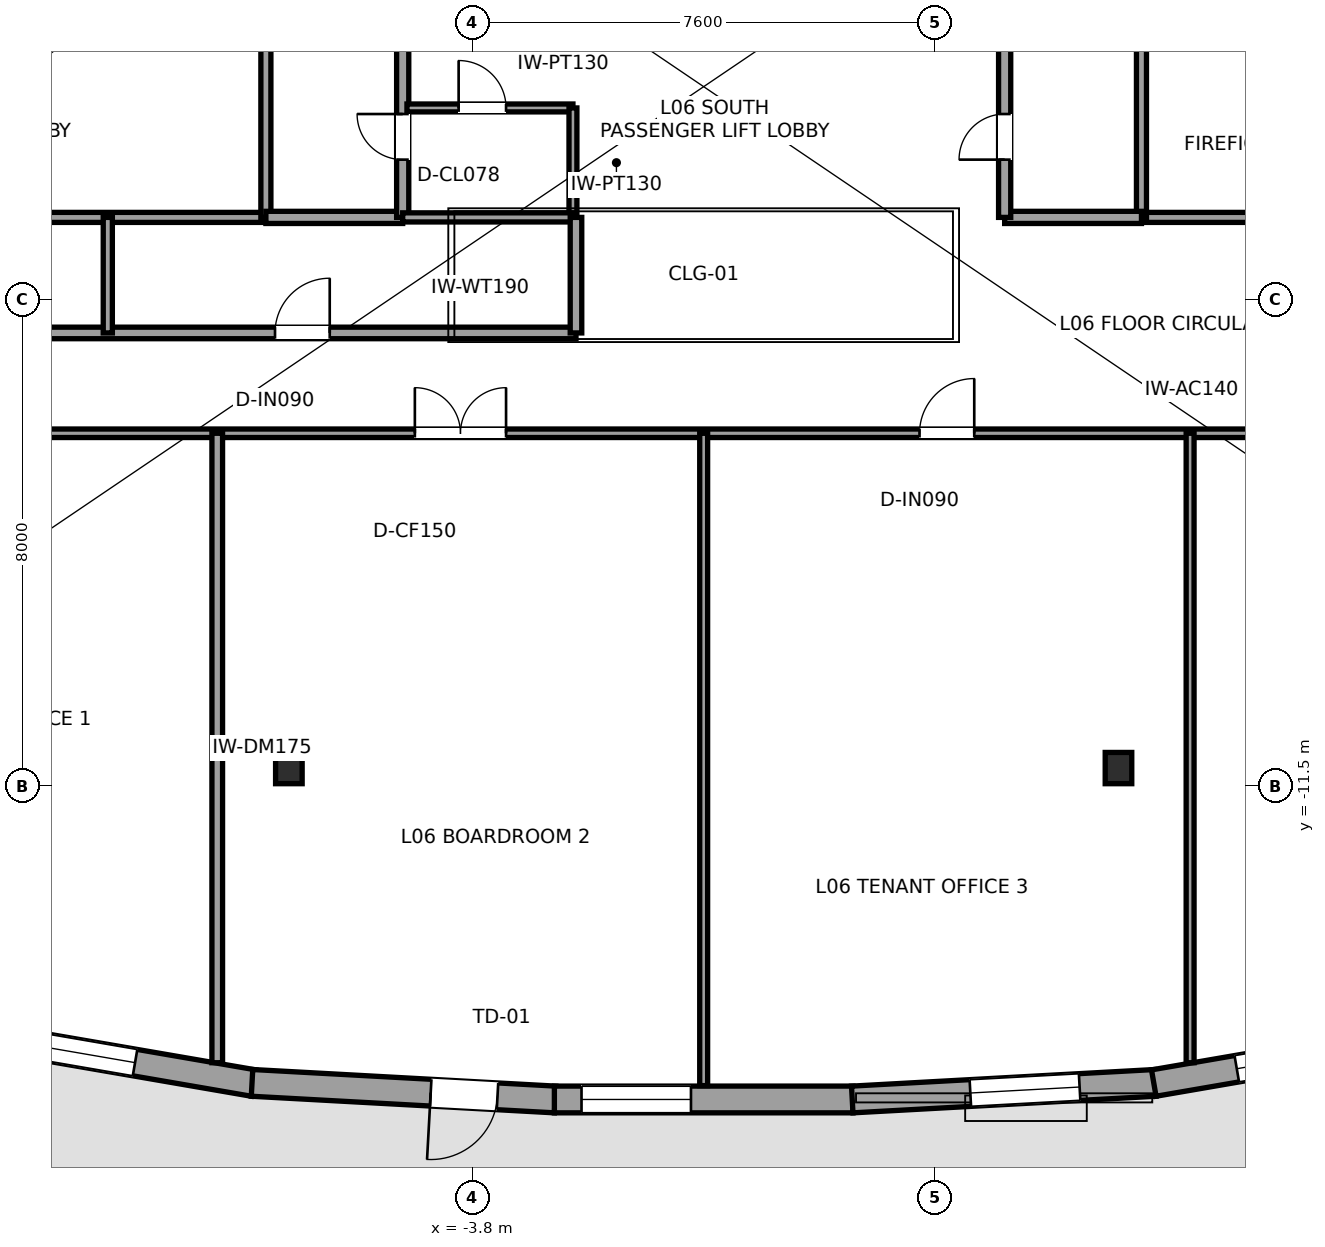
"""IFC4 building model, lengths in metres.
Left out: names, types, materials, properties, quantities, classifications, styles, units other than length and angle.
Written with IfcOpenShell. Run it as: python <this file> out.ifc"""

import sys

from ifc_helpers import new_model, si_unit, direction, frame, frame_2d, origin, origin_2d, place, context, subcontext, project, spatial, rectangle, i_section, extrude, element, fill, save


model = new_model("IFC4")
c1 = context("Model", 3, precision=1e-05, world=origin(), true_north=direction((0.0, 1.0)))
c2 = subcontext(c1, "Body", "Model", "MODEL_VIEW")
j1 = project(units=[si_unit("LENGTHUNIT", "METRE"), si_unit("PLANEANGLEUNIT", "RADIAN")], contexts=[c1])
p1 = place(None, origin())
s1 = spatial("IfcSite", under=j1, at=p1, CompositionType="ELEMENT")
p2 = place(p1, origin())
s2 = spatial("IfcBuilding", under=s1, at=p2, CompositionType="ELEMENT")
p3 = place(p2, frame((0.0, 0.0, 27.0)))
s3 = spatial("IfcBuildingStorey", under=s2, at=p3, CompositionType="ELEMENT", Elevation=27.0)
for number, where, z_axis, x_axis in (
    (1, (-6.822, -11.206, 0.0), (0.0, 0.0, 1.0), (1.0, 0.0, 0.0)),
    (2, (6.822, -11.206, 0.0), (0.0, 0.0, 1.0), (1.0, 0.0, 0.0)),
):
    element("IfcColumn", number, at=place(p3, frame(where, z_axis=z_axis, x_axis=x_axis)), inside=s3, PredefinedType="COLUMN", context=c2, shape_type="SweptSolid", body=[
        extrude(i_section(OverallWidth=0.437, OverallDepth=0.514, WebThickness=0.061, FlangeThickness=0.097, at=origin_2d()), origin(), (0.0, 0.0, 1.0), 3.6),
    ])
p4 = place(p3, frame((-7.403, -16.386, 0.0), z_axis=(0.0, 0.0, 1.0), x_axis=(-0.985480149415, 0.169790680278, 0.0)))
e3 = element("IfcWall", 3, at=p4, inside=s3, PredefinedType="STANDARD", context=c2, shape_type="SweptSolid", body=[
    extrude(rectangle(XDim=5.064, YDim=0.44, at=frame_2d((2.532, 0.0))), origin(), (0.0, 0.0, 1.0), 2.533),
])
p5 = place(p4, frame((1.978, 0.0, 0.65)))
e4 = element("IfcOpeningElement", 4, at=p5, cuts=e3, PredefinedType="OPENING", context=c2, shape_type="SweptSolid", body=[
    extrude(rectangle(XDim=1.8, YDim=1.7, at=frame_2d((0.9, 0.85))), frame((0.0, 0.23, 0.0), z_axis=(0.0, -1.0, 0.0), x_axis=(1.0, 0.0, 0.0)), (0.0, 0.0, 1.0), 0.46),
])
p6 = place(p3, frame((-2.443, -16.656, 0.0), z_axis=(0.0, 0.0, 1.0), x_axis=(-0.998501456853, 0.054725137396, 0.0)))
e5 = element("IfcWall", 5, at=p6, inside=s3, PredefinedType="STANDARD", context=c2, shape_type="SweptSolid", body=[
    extrude(rectangle(XDim=4.992, YDim=0.44, at=frame_2d((2.496, 0.0))), origin(), (0.0, 0.0, 1.0), 2.533),
])
p7 = place(p6, frame((0.949, 0.0, 0.0)))
e6 = element("IfcOpeningElement", 6, at=p7, cuts=e5, PredefinedType="OPENING", context=c2, shape_type="SweptSolid", body=[
    extrude(rectangle(XDim=1.1, YDim=2.15, at=frame_2d((0.55, 1.075))), frame((0.0, 0.23, 0.0), z_axis=(0.0, -1.0, 0.0), x_axis=(1.0, 0.0, 0.0)), (0.0, 0.0, 1.0), 0.46),
])
p8 = place(p3, frame((2.455, -16.656, 0.0), z_axis=(0.0, 0.0, 1.0), x_axis=(-1.0, 0.0, 0.0)))
e7 = element("IfcWall", 7, at=p8, inside=s3, PredefinedType="STANDARD", context=c2, shape_type="SweptSolid", body=[
    extrude(rectangle(XDim=4.911, YDim=0.44, at=frame_2d((2.455, 0.0))), origin(), (0.0, 0.0, 1.0), 2.533),
])
p9 = place(p8, frame((2.664, 0.0, 0.65)))
e8 = element("IfcOpeningElement", 8, at=p9, cuts=e7, PredefinedType="OPENING", context=c2, shape_type="SweptSolid", body=[
    extrude(rectangle(XDim=1.8, YDim=1.7, at=frame_2d((0.9, 0.85))), frame((0.0, 0.23, 0.0), z_axis=(0.0, -1.0, 0.0), x_axis=(1.0, 0.0, 0.0)), (0.0, 0.0, 1.0), 0.46),
])
p10 = place(p3, frame((7.428, -16.383, 0.0), z_axis=(0.0, 0.0, 1.0), x_axis=(-0.998501456853, -0.054725137396, 0.0)))
e9 = element("IfcWall", 9, at=p10, inside=s3, PredefinedType="STANDARD", context=c2, shape_type="SweptSolid", body=[
    extrude(rectangle(XDim=4.992, YDim=0.44, at=frame_2d((2.496, 0.0))), origin(), (0.0, 0.0, 1.0), 2.533),
])
p11 = place(p10, frame((1.247, 0.0, 0.65)))
e10 = element("IfcOpeningElement", 10, at=p11, cuts=e9, PredefinedType="OPENING", context=c2, shape_type="SweptSolid", body=[
    extrude(rectangle(XDim=1.8, YDim=1.7, at=frame_2d((0.9, 0.85))), frame((0.0, 0.23, 0.0), z_axis=(0.0, -1.0, 0.0), x_axis=(1.0, 0.0, 0.0)), (0.0, 0.0, 1.0), 0.46),
])
p12 = place(p3, frame((12.393, -15.526, 0.0), z_axis=(0.0, 0.0, 1.0), x_axis=(-0.985480149415, -0.169790680278, 0.0)))
e11 = element("IfcWall", 11, at=p12, inside=s3, PredefinedType="STANDARD", context=c2, shape_type="SweptSolid", body=[
    extrude(rectangle(XDim=5.064, YDim=0.44, at=frame_2d((2.532, 0.0))), origin(), (0.0, 0.0, 1.0), 2.533),
])
p13 = place(p12, frame((1.879, 0.0, 0.65)))
e12 = element("IfcOpeningElement", 12, at=p13, cuts=e11, PredefinedType="OPENING", context=c2, shape_type="SweptSolid", body=[
    extrude(rectangle(XDim=1.8, YDim=1.7, at=frame_2d((0.9, 0.85))), frame((0.0, 0.23, 0.0), z_axis=(0.0, -1.0, 0.0), x_axis=(1.0, 0.0, 0.0)), (0.0, 0.0, 1.0), 0.46),
])
p14 = place(p3, frame((-13.45, -2.15, 0.0), z_axis=(0.0, 0.0, 1.0), x_axis=(1.0, 0.0, 0.0)))
e13 = element("IfcWall", 13, at=p14, inside=s3, PredefinedType="PARTITIONING", context=c2, shape_type="SweptSolid", body=[
    extrude(rectangle(XDim=6.25, YDim=0.165, at=frame_2d((3.125, 0.0))), origin(), (0.0, 0.0, 1.0), 3.4),
])
p15 = place(p3, frame((-7.2, -2.15, 0.0), z_axis=(0.0, 0.0, 1.0), x_axis=(0.0, 1.0, 0.0)))
e14 = element("IfcWall", 14, at=p15, inside=s3, PredefinedType="PARTITIONING", context=c2, shape_type="SweptSolid", body=[
    extrude(rectangle(XDim=3.15, YDim=0.165, at=frame_2d((1.575, 0.0))), origin(), (0.0, 0.0, 1.0), 2.853),
])
p16 = place(p3, frame((-7.2, -2.15, 0.0), z_axis=(0.0, 0.0, 1.0), x_axis=(1.0, 0.0, 0.0)))
e15 = element("IfcWall", 15, at=p16, inside=s3, PredefinedType="SOLIDWALL", context=c2, shape_type="SweptSolid", body=[
    extrude(rectangle(XDim=2.25, YDim=0.2, at=frame_2d((1.125, 0.0))), origin(), (0.0, 0.0, 1.0), 3.4),
])
p17 = place(p3, frame((-4.95, -2.15, 0.0), z_axis=(0.0, 0.0, 1.0), x_axis=(0.0, 1.0, 0.0)))
e16 = element("IfcWall", 16, at=p17, inside=s3, PredefinedType="SOLIDWALL", context=c2, shape_type="SweptSolid", body=[
    extrude(rectangle(XDim=3.15, YDim=0.2, at=frame_2d((1.575, 0.0))), origin(), (0.0, 0.0, 1.0), 2.853),
])
p18 = place(p17, frame((0.95, 0.0, 0.0)))
e17 = element("IfcOpeningElement", 17, at=p18, cuts=e16, PredefinedType="OPENING", context=c2, shape_type="SweptSolid", body=[
    extrude(rectangle(XDim=0.75, YDim=2.1, at=frame_2d((0.375, 1.05))), frame((0.0, 0.11, 0.0), z_axis=(0.0, -1.0, 0.0), x_axis=(1.0, 0.0, 0.0)), (0.0, 0.0, 1.0), 0.22),
])
p19 = place(p3, frame((7.2, -2.15, 0.0), z_axis=(0.0, 0.0, 1.0), x_axis=(1.0, 0.0, 0.0)))
e18 = element("IfcWall", 18, at=p19, inside=s3, PredefinedType="PARTITIONING", context=c2, shape_type="SweptSolid", body=[
    extrude(rectangle(XDim=6.25, YDim=0.165, at=frame_2d((3.125, 0.0))), origin(), (0.0, 0.0, 1.0), 2.853),
])
p20 = place(p3, frame((7.2, -2.15, 0.0), z_axis=(0.0, 0.0, 1.0), x_axis=(0.0, 1.0, 0.0)))
e19 = element("IfcWall", 19, at=p20, inside=s3, PredefinedType="PARTITIONING", context=c2, shape_type="SweptSolid", body=[
    extrude(rectangle(XDim=3.15, YDim=0.165, at=frame_2d((1.575, 0.0))), origin(), (0.0, 0.0, 1.0), 2.853),
])
p21 = place(p3, frame((4.95, -2.15, 0.0), z_axis=(0.0, 0.0, 1.0), x_axis=(1.0, 0.0, 0.0)))
e20 = element("IfcWall", 20, at=p21, inside=s3, PredefinedType="SOLIDWALL", context=c2, shape_type="SweptSolid", body=[
    extrude(rectangle(XDim=2.25, YDim=0.2, at=frame_2d((1.125, 0.0))), origin(), (0.0, 0.0, 1.0), 3.4),
])
p22 = place(p3, frame((4.95, -2.15, 0.0), z_axis=(0.0, 0.0, 1.0), x_axis=(0.0, 1.0, 0.0)))
e21 = element("IfcWall", 21, at=p22, inside=s3, PredefinedType="SOLIDWALL", context=c2, shape_type="SweptSolid", body=[
    extrude(rectangle(XDim=3.15, YDim=0.2, at=frame_2d((1.575, 0.0))), origin(), (0.0, 0.0, 1.0), 2.853),
])
p23 = place(p22, frame((0.95, 0.0, 0.0)))
e22 = element("IfcOpeningElement", 22, at=p23, cuts=e21, PredefinedType="OPENING", context=c2, shape_type="SweptSolid", body=[
    extrude(rectangle(XDim=0.75, YDim=2.1, at=frame_2d((0.375, 1.05))), frame((0.0, 0.11, 0.0), z_axis=(0.0, -1.0, 0.0), x_axis=(1.0, 0.0, 0.0)), (0.0, 0.0, 1.0), 0.22),
])
p24 = place(p3, frame((-4.88, -0.35, 0.0), z_axis=(0.0, 0.0, 1.0), x_axis=(1.0, 0.0, 0.0)))
e23 = element("IfcWall", 23, at=p24, inside=s3, PredefinedType="PARTITIONING", context=c2, shape_type="SweptSolid", body=[
    extrude(rectangle(XDim=2.73, YDim=0.13, at=frame_2d((1.365, 0.0))), origin(), (0.0, 0.0, 1.0), 3.4),
])
p25 = place(p24, frame((0.85, 0.0, 0.0)))
e24 = element("IfcOpeningElement", 24, at=p25, cuts=e23, PredefinedType="OPENING", context=c2, shape_type="SweptSolid", body=[
    extrude(rectangle(XDim=0.78, YDim=2.1, at=frame_2d((0.39, 1.05))), frame((0.0, 0.075, 0.0), z_axis=(0.0, -1.0, 0.0), x_axis=(1.0, 0.0, 0.0)), (0.0, 0.0, 1.0), 0.15),
])
p26 = place(p3, frame((-2.15, -2.15, 0.0), z_axis=(0.0, 0.0, 1.0), x_axis=(0.0, 1.0, 0.0)))
e25 = element("IfcWall", 25, at=p26, inside=s3, PredefinedType="PARTITIONING", context=c2, shape_type="SweptSolid", body=[
    extrude(rectangle(XDim=1.8, YDim=0.13, at=frame_2d((0.9, 0.0))), origin(), (0.0, 0.0, 1.0), 3.4),
])
p27 = place(p3, frame((-13.45, -4.05, 0.0), z_axis=(0.0, 0.0, 1.0), x_axis=(1.0, 0.0, 0.0)))
e26 = element("IfcWall", 26, at=p27, inside=s3, PredefinedType="PLUMBINGWALL", context=c2, shape_type="SweptSolid", body=[
    extrude(rectangle(XDim=11.35, YDim=0.19, at=frame_2d((5.675, 0.0))), origin(), (0.0, 0.0, 1.0), 2.853),
])
p28 = place(p27, frame((1.25, 0.0, 0.0)))
e27 = element("IfcOpeningElement", 27, at=p28, cuts=e26, PredefinedType="OPENING", context=c2, shape_type="SweptSolid", body=[
    extrude(rectangle(XDim=0.95, YDim=2.15, at=frame_2d((0.475, 1.075))), frame((0.0, 0.105, 0.0), z_axis=(0.0, -1.0, 0.0), x_axis=(1.0, 0.0, 0.0)), (0.0, 0.0, 1.0), 0.21),
])
p29 = place(p27, frame((6.4, 0.0, 0.0)))
e28 = element("IfcOpeningElement", 28, at=p29, cuts=e26, PredefinedType="OPENING", context=c2, shape_type="SweptSolid", body=[
    extrude(rectangle(XDim=0.9, YDim=2.1, at=frame_2d((0.45, 1.05))), frame((0.0, 0.105, 0.0), z_axis=(0.0, -1.0, 0.0), x_axis=(1.0, 0.0, 0.0)), (0.0, 0.0, 1.0), 0.21),
])
p30 = place(p3, frame((-4.95, -2.15, 0.0), z_axis=(0.0, 0.0, 1.0), x_axis=(1.0, 0.0, 0.0)))
e29 = element("IfcWall", 29, at=p30, inside=s3, PredefinedType="PLUMBINGWALL", context=c2, shape_type="SweptSolid", body=[
    extrude(rectangle(XDim=2.85, YDim=0.15, at=frame_2d((1.425, 0.0))), origin(), (0.0, 0.0, 1.0), 2.853),
])
p31 = place(p3, frame((-2.1, -4.05, 0.0), z_axis=(0.0, 0.0, 1.0), x_axis=(0.0, 1.0, 0.0)))
e30 = element("IfcWall", 30, at=p31, inside=s3, PredefinedType="PLUMBINGWALL", context=c2, shape_type="SweptSolid", body=[
    extrude(rectangle(XDim=1.9, YDim=0.19, at=frame_2d((0.95, 0.0))), origin(), (0.0, 0.0, 1.0), 3.4),
])
p32 = place(p3, frame((-9.8, -4.05, 0.0), z_axis=(0.0, 0.0, 1.0), x_axis=(0.0, 1.0, 0.0)))
e31 = element("IfcWall", 31, at=p32, inside=s3, PredefinedType="PLUMBINGWALL", context=c2, shape_type="SweptSolid", body=[
    extrude(rectangle(XDim=1.9, YDim=0.15, at=frame_2d((0.95, 0.0))), origin(), (0.0, 0.0, 1.0), 2.853),
])
p33 = place(p3, frame((-16.1, -5.7, 0.0), z_axis=(0.0, 0.0, 1.0), x_axis=(1.0, 0.0, 0.0)))
e32 = element("IfcWall", 32, at=p33, inside=s3, PredefinedType="PARTITIONING", context=c2, shape_type="SweptSolid", body=[
    extrude(rectangle(XDim=32.2, YDim=0.14, at=frame_2d((16.1, 0.0))), origin(), (0.0, 0.0, 1.0), 2.853),
])
p34 = place(p33, frame((3.6, 0.0, 0.0)))
e33 = element("IfcOpeningElement", 33, at=p34, cuts=e32, PredefinedType="OPENING", context=c2, shape_type="SweptSolid", body=[
    extrude(rectangle(XDim=0.9, YDim=2.1, at=frame_2d((0.45, 1.05))), frame((0.0, 0.08, 0.0), z_axis=(0.0, -1.0, 0.0), x_axis=(1.0, 0.0, 0.0)), (0.0, 0.0, 1.0), 0.16),
])
p35 = place(p33, frame((11.35, 0.0, 0.0)))
e34 = element("IfcOpeningElement", 34, at=p35, cuts=e32, PredefinedType="OPENING", context=c2, shape_type="SweptSolid", body=[
    extrude(rectangle(XDim=1.5, YDim=2.15, at=frame_2d((0.75, 1.075))), frame((0.0, 0.08, 0.0), z_axis=(0.0, -1.0, 0.0), x_axis=(1.0, 0.0, 0.0)), (0.0, 0.0, 1.0), 0.16),
])
p36 = place(p33, frame((19.65, 0.0, 0.0)))
e35 = element("IfcOpeningElement", 35, at=p36, cuts=e32, PredefinedType="OPENING", context=c2, shape_type="SweptSolid", body=[
    extrude(rectangle(XDim=0.9, YDim=2.1, at=frame_2d((0.45, 1.05))), frame((0.0, 0.08, 0.0), z_axis=(0.0, -1.0, 0.0), x_axis=(1.0, 0.0, 0.0)), (0.0, 0.0, 1.0), 0.16),
])
p37 = place(p33, frame((27.7, 0.0, 0.0)))
e36 = element("IfcOpeningElement", 36, at=p37, cuts=e32, PredefinedType="OPENING", context=c2, shape_type="SweptSolid", body=[
    extrude(rectangle(XDim=0.9, YDim=2.1, at=frame_2d((0.45, 1.05))), frame((0.0, 0.08, 0.0), z_axis=(0.0, -1.0, 0.0), x_axis=(1.0, 0.0, 0.0)), (0.0, 0.0, 1.0), 0.16),
])
p38 = place(p3, frame((-8.0, -16.052, 0.0), z_axis=(0.0, 0.0, 1.0), x_axis=(0.0, 1.0, 0.0)))
e37 = element("IfcWall", 37, at=p38, inside=s3, PredefinedType="PARTITIONING", context=c2, shape_type="SweptSolid", body=[
    extrude(rectangle(XDim=10.352, YDim=0.175, at=frame_2d((5.176, 0.0))), origin(), (0.0, 0.0, 1.0), 2.853),
])
p39 = place(p3, frame((0.0, -16.428, 0.0), z_axis=(0.0, 0.0, 1.0), x_axis=(0.0, 1.0, 0.0)))
e38 = element("IfcWall", 38, at=p39, inside=s3, PredefinedType="PARTITIONING", context=c2, shape_type="SweptSolid", body=[
    extrude(rectangle(XDim=10.728, YDim=0.13, at=frame_2d((5.364, 0.0))), origin(), (0.0, 0.0, 1.0), 2.853),
])
p40 = place(p3, frame((8.0, -16.052, 0.0), z_axis=(0.0, 0.0, 1.0), x_axis=(0.0, 1.0, 0.0)))
e39 = element("IfcWall", 39, at=p40, inside=s3, PredefinedType="PARTITIONING", context=c2, shape_type="SweptSolid", body=[
    extrude(rectangle(XDim=10.352, YDim=0.13, at=frame_2d((5.176, 0.0))), origin(), (0.0, 0.0, 1.0), 2.853),
])
p41 = place(p5, origin())
e40 = element("IfcWindow", 40, at=p41, inside=s3, PartitioningType="SINGLE_PANEL", PredefinedType="WINDOW", context=c2, shape_type="SweptSolid", body=[
    extrude(rectangle(XDim=1.8, YDim=1.7, at=frame_2d((0.9, 0.85))), frame((0.0, -0.01, 0.0), z_axis=(0.0, -1.0, 0.0), x_axis=(1.0, 0.0, 0.0)), (0.0, 0.0, 1.0), 0.06),
])
fill(e4, e40)
p42 = place(p7, origin())
e41 = element("IfcDoor", 41, at=p42, inside=s3, OperationType="SINGLE_SWING_RIGHT", PredefinedType="DOOR", context=c2, shape_type="SweptSolid", body=[
    extrude(rectangle(XDim=1.1, YDim=2.15, at=frame_2d((0.55, 1.075))), frame((0.0, 0.025, 0.0), z_axis=(0.0, -1.0, 0.0), x_axis=(1.0, 0.0, 0.0)), (0.0, 0.0, 1.0), 0.05),
])
fill(e6, e41)
p43 = place(p9, origin())
e42 = element("IfcWindow", 42, at=p43, inside=s3, PartitioningType="SINGLE_PANEL", PredefinedType="WINDOW", context=c2, shape_type="SweptSolid", body=[
    extrude(rectangle(XDim=1.8, YDim=1.7, at=frame_2d((0.9, 0.85))), frame((0.0, -0.01, 0.0), z_axis=(0.0, -1.0, 0.0), x_axis=(1.0, 0.0, 0.0)), (0.0, 0.0, 1.0), 0.06),
])
fill(e8, e42)
p44 = place(p11, origin())
e43 = element("IfcWindow", 43, at=p44, inside=s3, PartitioningType="SINGLE_PANEL", PredefinedType="WINDOW", context=c2, shape_type="SweptSolid", body=[
    extrude(rectangle(XDim=1.8, YDim=1.7, at=frame_2d((0.9, 0.85))), frame((0.0, -0.01, 0.0), z_axis=(0.0, -1.0, 0.0), x_axis=(1.0, 0.0, 0.0)), (0.0, 0.0, 1.0), 0.06),
])
fill(e10, e43)
p45 = place(p13, origin())
e44 = element("IfcWindow", 44, at=p45, inside=s3, PartitioningType="SINGLE_PANEL", PredefinedType="WINDOW", context=c2, shape_type="SweptSolid", body=[
    extrude(rectangle(XDim=1.8, YDim=1.7, at=frame_2d((0.9, 0.85))), frame((0.0, -0.01, 0.0), z_axis=(0.0, -1.0, 0.0), x_axis=(1.0, 0.0, 0.0)), (0.0, 0.0, 1.0), 0.06),
])
fill(e12, e44)
p46 = place(p18, origin())
e45 = element("IfcDoor", 45, at=p46, inside=s3, OperationType="SINGLE_SWING_RIGHT", PredefinedType="DOOR", context=c2, shape_type="SweptSolid", body=[
    extrude(rectangle(XDim=0.75, YDim=2.1, at=frame_2d((0.375, 1.05))), frame((0.0, 0.025, 0.0), z_axis=(0.0, -1.0, 0.0), x_axis=(1.0, 0.0, 0.0)), (0.0, 0.0, 1.0), 0.05),
])
fill(e17, e45)
p47 = place(p23, origin())
e46 = element("IfcDoor", 46, at=p47, inside=s3, OperationType="SINGLE_SWING_LEFT", PredefinedType="DOOR", context=c2, shape_type="SweptSolid", body=[
    extrude(rectangle(XDim=0.75, YDim=2.1, at=frame_2d((0.375, 1.05))), frame((0.0, 0.025, 0.0), z_axis=(0.0, -1.0, 0.0), x_axis=(1.0, 0.0, 0.0)), (0.0, 0.0, 1.0), 0.05),
])
fill(e22, e46)
p48 = place(p25, origin())
e47 = element("IfcDoor", 47, at=p48, inside=s3, OperationType="SINGLE_SWING_LEFT", PredefinedType="DOOR", context=c2, shape_type="SweptSolid", body=[
    extrude(rectangle(XDim=0.78, YDim=2.1, at=frame_2d((0.39, 1.05))), frame((0.0, 0.025, 0.0), z_axis=(0.0, -1.0, 0.0), x_axis=(1.0, 0.0, 0.0)), (0.0, 0.0, 1.0), 0.05),
])
fill(e24, e47)
p49 = place(p29, origin())
e48 = element("IfcDoor", 48, at=p49, inside=s3, OperationType="SINGLE_SWING_RIGHT", PredefinedType="DOOR", context=c2, shape_type="SweptSolid", body=[
    extrude(rectangle(XDim=0.9, YDim=2.1, at=frame_2d((0.45, 1.05))), frame((0.0, 0.025, 0.0), z_axis=(0.0, -1.0, 0.0), x_axis=(1.0, 0.0, 0.0)), (0.0, 0.0, 1.0), 0.05),
])
fill(e28, e48)
p50 = place(p35, origin())
e49 = element("IfcDoor", 49, at=p50, inside=s3, OperationType="DOUBLE_DOOR_SINGLE_SWING", PredefinedType="DOOR", context=c2, shape_type="SweptSolid", body=[
    extrude(rectangle(XDim=1.5, YDim=2.15, at=frame_2d((0.75, 1.075))), frame((0.0, 0.025, 0.0), z_axis=(0.0, -1.0, 0.0), x_axis=(1.0, 0.0, 0.0)), (0.0, 0.0, 1.0), 0.05),
])
fill(e34, e49)
p51 = place(p36, origin())
e50 = element("IfcDoor", 50, at=p51, inside=s3, OperationType="SINGLE_SWING_RIGHT", PredefinedType="DOOR", context=c2, shape_type="SweptSolid", body=[
    extrude(rectangle(XDim=0.9, YDim=2.1, at=frame_2d((0.45, 1.05))), frame((0.0, 0.025, 0.0), z_axis=(0.0, -1.0, 0.0), x_axis=(1.0, 0.0, 0.0)), (0.0, 0.0, 1.0), 0.05),
])
fill(e35, e50)
save(model, sys.argv[1])
